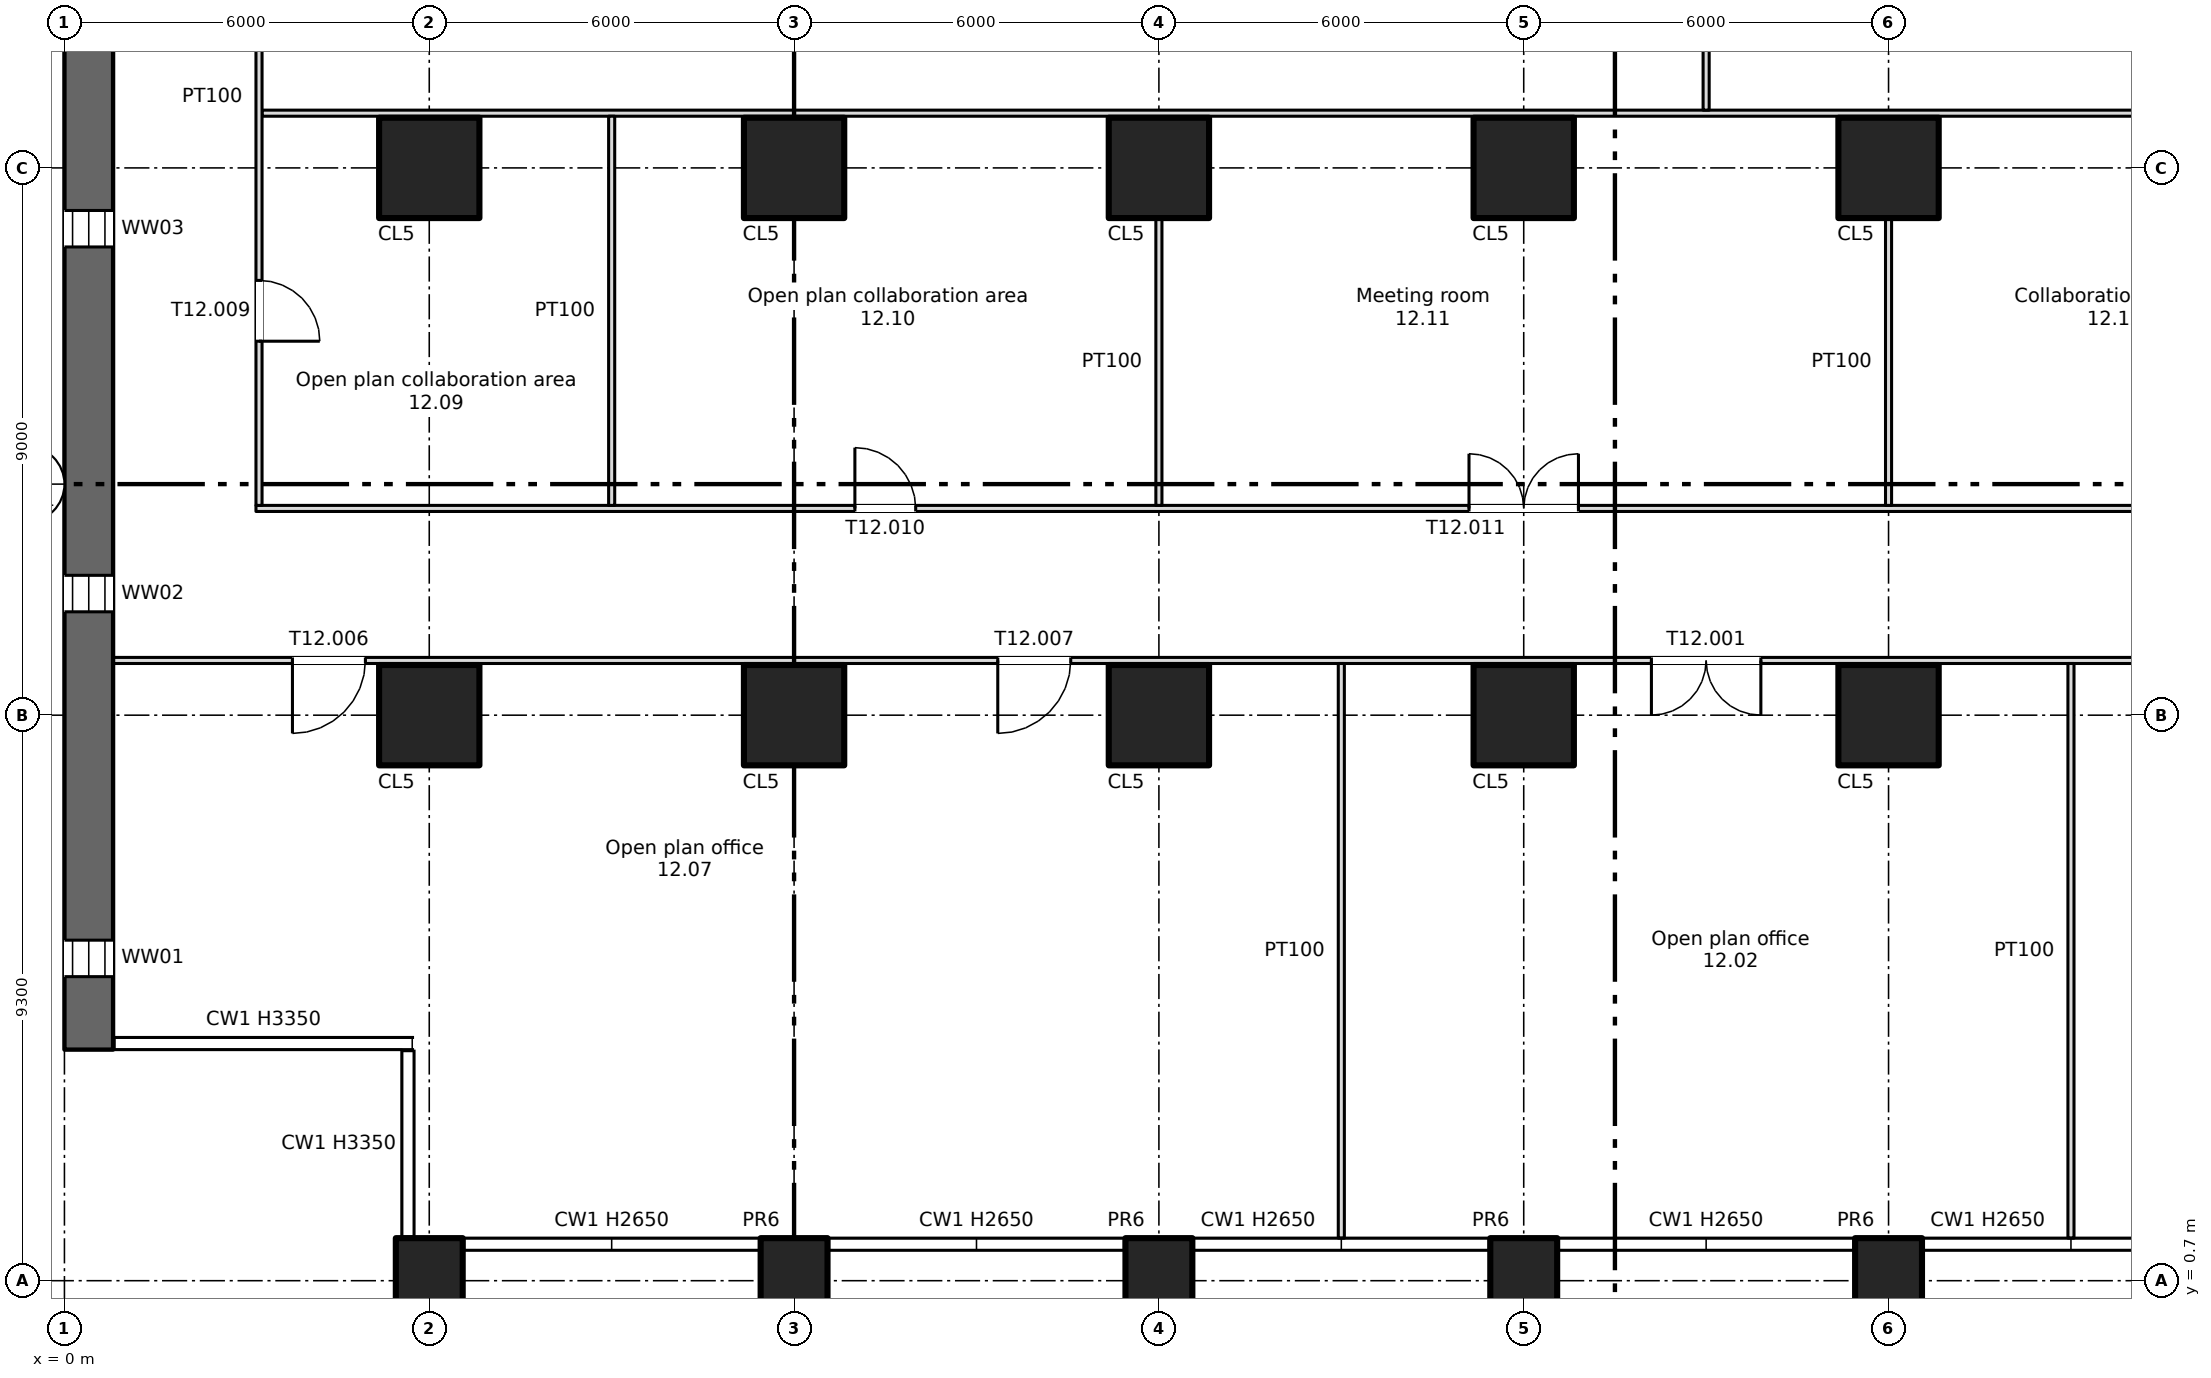
"""IFC4 building model, lengths in metres.
Left out: names, types, materials, properties, quantities, classifications, styles, units other than length and angle.
Written with IfcOpenShell. Run it as: python <this file> out.ifc"""

import sys

from ifc_helpers import new_model, si_unit, direction, frame, frame_2d, origin, origin_2d, place, context, subcontext, project, spatial, rectangle, extrude, element, fill, save


model = new_model("IFC4")
c1 = context("Model", 3, precision=1e-05, world=origin(), true_north=direction((0.0, 1.0)))
c2 = subcontext(c1, "Body", "Model", "MODEL_VIEW")
j1 = project(units=[si_unit("LENGTHUNIT", "METRE"), si_unit("PLANEANGLEUNIT", "RADIAN")], contexts=[c1])
p1 = place(None, origin())
s1 = spatial("IfcSite", under=j1, at=p1, CompositionType="ELEMENT")
p2 = place(p1, origin())
s2 = spatial("IfcBuilding", under=s1, at=p2, CompositionType="ELEMENT")
p3 = place(p2, frame((0.0, 0.0, 60.0)))
s3 = spatial("IfcBuildingStorey", under=s2, at=p3, CompositionType="ELEMENT", Elevation=60.0)
for number, where, z_axis, x_axis in (
    (1, (6.0, 0.7, -0.4), (0.0, 0.0, 1.0), (1.0, 0.0, 0.0)),
    (2, (12.0, 0.7, -0.4), (0.0, 0.0, 1.0), (1.0, 0.0, 0.0)),
    (3, (18.0, 0.7, -0.4), (0.0, 0.0, 1.0), (1.0, 0.0, 0.0)),
    (4, (24.0, 0.7, -0.4), (0.0, 0.0, 1.0), (1.0, 0.0, 0.0)),
    (5, (30.0, 0.7, -0.4), (0.0, 0.0, 1.0), (1.0, 0.0, 0.0)),
):
    element("IfcColumn", number, at=place(p3, frame(where, z_axis=z_axis, x_axis=x_axis)), inside=s3, PredefinedType="COLUMN", context=c2, shape_type="SweptSolid", body=[
        extrude(rectangle(XDim=1.1, YDim=1.4, at=origin_2d()), origin(), (0.0, 0.0, 1.0), 3.75),
    ])
for number, where, z_axis, x_axis in (
    (6, (6.0, 10.0, 0.0), (0.0, 0.0, 1.0), (1.0, 0.0, 0.0)),
    (7, (6.0, 19.0, 0.0), (0.0, 0.0, 1.0), (1.0, 0.0, 0.0)),
    (8, (12.0, 10.0, 0.0), (0.0, 0.0, 1.0), (1.0, 0.0, 0.0)),
    (9, (12.0, 19.0, 0.0), (0.0, 0.0, 1.0), (1.0, 0.0, 0.0)),
    (10, (18.0, 10.0, 0.0), (0.0, 0.0, 1.0), (1.0, 0.0, 0.0)),
    (11, (18.0, 19.0, 0.0), (0.0, 0.0, 1.0), (1.0, 0.0, 0.0)),
    (12, (24.0, 10.0, 0.0), (0.0, 0.0, 1.0), (1.0, 0.0, 0.0)),
    (13, (24.0, 19.0, 0.0), (0.0, 0.0, 1.0), (1.0, 0.0, 0.0)),
    (14, (30.0, 10.0, 0.0), (0.0, 0.0, 1.0), (1.0, 0.0, 0.0)),
    (15, (30.0, 19.0, 0.0), (0.0, 0.0, 1.0), (1.0, 0.0, 0.0)),
):
    element("IfcColumn", number, at=place(p3, frame(where, z_axis=z_axis, x_axis=x_axis)), inside=s3, PredefinedType="COLUMN", context=c2, shape_type="SweptSolid", body=[
        extrude(rectangle(XDim=1.65, YDim=1.65, at=origin_2d()), origin(), (0.0, 0.0, 1.0), 3.35),
    ])
p4 = place(p3, frame((0.4, 4.5, 0.0), z_axis=(0.0, 0.0, 1.0), x_axis=(0.0, 1.0, 0.0)))
e16 = element("IfcWall", 16, at=p4, inside=s3, PredefinedType="SHEAR", context=c2, shape_type="SweptSolid", body=[
    extrude(rectangle(XDim=37.0, YDim=0.8, at=frame_2d((18.5, 0.0))), origin(), (0.0, 0.0, 1.0), 3.35),
])
p5 = place(p4, frame((1.2, 0.0, 0.6)))
e17 = element("IfcOpeningElement", 17, at=p5, cuts=e16, PredefinedType="OPENING", context=c2, shape_type="SweptSolid", body=[
    extrude(rectangle(XDim=0.6, YDim=2.4, at=frame_2d((0.3, 1.2))), frame((0.0, 0.41, 0.0), z_axis=(0.0, -1.0, 0.0), x_axis=(1.0, 0.0, 0.0)), (0.0, 0.0, 1.0), 0.82),
])
p6 = place(p4, frame((7.2, 0.0, 0.6)))
e18 = element("IfcOpeningElement", 18, at=p6, cuts=e16, PredefinedType="OPENING", context=c2, shape_type="SweptSolid", body=[
    extrude(rectangle(XDim=0.6, YDim=2.4, at=frame_2d((0.3, 1.2))), frame((0.0, 0.41, 0.0), z_axis=(0.0, -1.0, 0.0), x_axis=(1.0, 0.0, 0.0)), (0.0, 0.0, 1.0), 0.82),
])
p7 = place(p4, frame((13.2, 0.0, 0.6)))
e19 = element("IfcOpeningElement", 19, at=p7, cuts=e16, PredefinedType="OPENING", context=c2, shape_type="SweptSolid", body=[
    extrude(rectangle(XDim=0.6, YDim=2.4, at=frame_2d((0.3, 1.2))), frame((0.0, 0.41, 0.0), z_axis=(0.0, -1.0, 0.0), x_axis=(1.0, 0.0, 0.0)), (0.0, 0.0, 1.0), 0.82),
])
p8 = place(p4, frame((19.2, 0.0, 0.6)))
e20 = element("IfcOpeningElement", 20, at=p8, cuts=e16, PredefinedType="OPENING", context=c2, shape_type="SweptSolid", body=[
    extrude(rectangle(XDim=0.6, YDim=2.4, at=frame_2d((0.3, 1.2))), frame((0.0, 0.41, 0.0), z_axis=(0.0, -1.0, 0.0), x_axis=(1.0, 0.0, 0.0)), (0.0, 0.0, 1.0), 0.82),
])
p9 = place(p4, frame((25.2, 0.0, 0.6)))
e21 = element("IfcOpeningElement", 21, at=p9, cuts=e16, PredefinedType="OPENING", context=c2, shape_type="SweptSolid", body=[
    extrude(rectangle(XDim=0.6, YDim=2.4, at=frame_2d((0.3, 1.2))), frame((0.0, 0.41, 0.0), z_axis=(0.0, -1.0, 0.0), x_axis=(1.0, 0.0, 0.0)), (0.0, 0.0, 1.0), 0.82),
])
p10 = place(p4, frame((31.2, 0.0, 0.6)))
e22 = element("IfcOpeningElement", 22, at=p10, cuts=e16, PredefinedType="OPENING", context=c2, shape_type="SweptSolid", body=[
    extrude(rectangle(XDim=0.6, YDim=2.4, at=frame_2d((0.3, 1.2))), frame((0.0, 0.41, 0.0), z_axis=(0.0, -1.0, 0.0), x_axis=(1.0, 0.0, 0.0)), (0.0, 0.0, 1.0), 0.82),
])
p11 = place(p3, frame((0.8, 10.9, 0.0), z_axis=(0.0, 0.0, 1.0), x_axis=(1.0, 0.0, 0.0)))
e23 = element("IfcWall", 23, at=p11, inside=s3, PredefinedType="PARTITIONING", context=c2, shape_type="SweptSolid", body=[
    extrude(rectangle(XDim=76.4, YDim=0.1, at=frame_2d((38.2, 0.0))), origin(), (0.0, 0.0, 1.0), 3.35),
])
p12 = place(p11, frame((25.3, 0.0, 0.0)))
e24 = element("IfcOpeningElement", 24, at=p12, cuts=e23, PredefinedType="OPENING", context=c2, shape_type="SweptSolid", body=[
    extrude(rectangle(XDim=1.8, YDim=2.1, at=frame_2d((0.9, 1.05))), frame((0.0, 0.06, 0.0), z_axis=(0.0, -1.0, 0.0), x_axis=(1.0, 0.0, 0.0)), (0.0, 0.0, 1.0), 0.12),
])
p13 = place(p11, frame((37.3, 0.0, 0.0)))
e25 = element("IfcOpeningElement", 25, at=p13, cuts=e23, PredefinedType="OPENING", context=c2, shape_type="SweptSolid", body=[
    extrude(rectangle(XDim=1.8, YDim=2.1, at=frame_2d((0.9, 1.05))), frame((0.0, 0.06, 0.0), z_axis=(0.0, -1.0, 0.0), x_axis=(1.0, 0.0, 0.0)), (0.0, 0.0, 1.0), 0.12),
])
p14 = place(p11, frame((48.2, 0.0, 0.0)))
e26 = element("IfcOpeningElement", 26, at=p14, cuts=e23, PredefinedType="OPENING", context=c2, shape_type="SweptSolid", body=[
    extrude(rectangle(XDim=1.0, YDim=2.1, at=frame_2d((0.5, 1.05))), frame((0.0, 0.06, 0.0), z_axis=(0.0, -1.0, 0.0), x_axis=(1.0, 0.0, 0.0)), (0.0, 0.0, 1.0), 0.12),
])
p15 = place(p11, frame((54.2, 0.0, 0.0)))
e27 = element("IfcOpeningElement", 27, at=p15, cuts=e23, PredefinedType="OPENING", context=c2, shape_type="SweptSolid", body=[
    extrude(rectangle(XDim=1.0, YDim=2.1, at=frame_2d((0.5, 1.05))), frame((0.0, 0.06, 0.0), z_axis=(0.0, -1.0, 0.0), x_axis=(1.0, 0.0, 0.0)), (0.0, 0.0, 1.0), 0.12),
])
p16 = place(p11, frame((61.3, 0.0, 0.0)))
e28 = element("IfcOpeningElement", 28, at=p16, cuts=e23, PredefinedType="OPENING", context=c2, shape_type="SweptSolid", body=[
    extrude(rectangle(XDim=1.8, YDim=2.1, at=frame_2d((0.9, 1.05))), frame((0.0, 0.06, 0.0), z_axis=(0.0, -1.0, 0.0), x_axis=(1.0, 0.0, 0.0)), (0.0, 0.0, 1.0), 0.12),
])
p17 = place(p11, frame((2.95, 0.0, 0.0)))
e29 = element("IfcOpeningElement", 29, at=p17, cuts=e23, PredefinedType="OPENING", context=c2, shape_type="SweptSolid", body=[
    extrude(rectangle(XDim=1.2, YDim=2.1, at=frame_2d((0.6, 1.05))), frame((0.0, 0.06, 0.0), z_axis=(0.0, -1.0, 0.0), x_axis=(1.0, 0.0, 0.0)), (0.0, 0.0, 1.0), 0.12),
])
p18 = place(p11, frame((14.55, 0.0, 0.0)))
e30 = element("IfcOpeningElement", 30, at=p18, cuts=e23, PredefinedType="OPENING", context=c2, shape_type="SweptSolid", body=[
    extrude(rectangle(XDim=1.2, YDim=2.1, at=frame_2d((0.6, 1.05))), frame((0.0, 0.06, 0.0), z_axis=(0.0, -1.0, 0.0), x_axis=(1.0, 0.0, 0.0)), (0.0, 0.0, 1.0), 0.12),
])
p19 = place(p11, frame((72.15, 0.0, 0.0)))
e31 = element("IfcOpeningElement", 31, at=p19, cuts=e23, PredefinedType="OPENING", context=c2, shape_type="SweptSolid", body=[
    extrude(rectangle(XDim=1.8, YDim=2.1, at=frame_2d((0.9, 1.05))), frame((0.0, 0.06, 0.0), z_axis=(0.0, -1.0, 0.0), x_axis=(1.0, 0.0, 0.0)), (0.0, 0.0, 1.0), 0.12),
])
p20 = place(p3, frame((3.15, 13.4, 0.0), z_axis=(0.0, 0.0, 1.0), x_axis=(1.0, 0.0, 0.0)))
e32 = element("IfcWall", 32, at=p20, inside=s3, PredefinedType="PARTITIONING", context=c2, shape_type="SweptSolid", body=[
    extrude(rectangle(XDim=71.7, YDim=0.1, at=frame_2d((35.85, 0.0))), origin(), (0.0, 0.0, 1.0), 3.35),
])
p21 = place(p20, frame((9.85, 0.0, 0.0)))
e33 = element("IfcOpeningElement", 33, at=p21, cuts=e32, PredefinedType="OPENING", context=c2, shape_type="SweptSolid", body=[
    extrude(rectangle(XDim=1.0, YDim=2.1, at=frame_2d((0.5, 1.05))), frame((0.0, 0.06, 0.0), z_axis=(0.0, -1.0, 0.0), x_axis=(1.0, 0.0, 0.0)), (0.0, 0.0, 1.0), 0.12),
])
p22 = place(p20, frame((19.95, 0.0, 0.0)))
e34 = element("IfcOpeningElement", 34, at=p22, cuts=e32, PredefinedType="OPENING", context=c2, shape_type="SweptSolid", body=[
    extrude(rectangle(XDim=1.8, YDim=2.1, at=frame_2d((0.9, 1.05))), frame((0.0, 0.06, 0.0), z_axis=(0.0, -1.0, 0.0), x_axis=(1.0, 0.0, 0.0)), (0.0, 0.0, 1.0), 0.12),
])
p23 = place(p20, frame((31.95, 0.0, 0.0)))
e35 = element("IfcOpeningElement", 35, at=p23, cuts=e32, PredefinedType="OPENING", context=c2, shape_type="SweptSolid", body=[
    extrude(rectangle(XDim=1.8, YDim=2.1, at=frame_2d((0.9, 1.05))), frame((0.0, 0.06, 0.0), z_axis=(0.0, -1.0, 0.0), x_axis=(1.0, 0.0, 0.0)), (0.0, 0.0, 1.0), 0.12),
])
p24 = place(p20, frame((43.95, 0.0, 0.0)))
e36 = element("IfcOpeningElement", 36, at=p24, cuts=e32, PredefinedType="OPENING", context=c2, shape_type="SweptSolid", body=[
    extrude(rectangle(XDim=1.8, YDim=2.1, at=frame_2d((0.9, 1.05))), frame((0.0, 0.06, 0.0), z_axis=(0.0, -1.0, 0.0), x_axis=(1.0, 0.0, 0.0)), (0.0, 0.0, 1.0), 0.12),
])
p25 = place(p20, frame((55.95, 0.0, 0.0)))
e37 = element("IfcOpeningElement", 37, at=p25, cuts=e32, PredefinedType="OPENING", context=c2, shape_type="SweptSolid", body=[
    extrude(rectangle(XDim=1.8, YDim=2.1, at=frame_2d((0.9, 1.05))), frame((0.0, 0.06, 0.0), z_axis=(0.0, -1.0, 0.0), x_axis=(1.0, 0.0, 0.0)), (0.0, 0.0, 1.0), 0.12),
])
p26 = place(p20, frame((66.75, 0.0, 0.0)))
e38 = element("IfcOpeningElement", 38, at=p26, cuts=e32, PredefinedType="OPENING", context=c2, shape_type="SweptSolid", body=[
    extrude(rectangle(XDim=1.0, YDim=2.1, at=frame_2d((0.5, 1.05))), frame((0.0, 0.06, 0.0), z_axis=(0.0, -1.0, 0.0), x_axis=(1.0, 0.0, 0.0)), (0.0, 0.0, 1.0), 0.12),
])
p27 = place(p3, frame((3.25, 19.9, 0.0), z_axis=(0.0, 0.0, 1.0), x_axis=(1.0, 0.0, 0.0)))
e39 = element("IfcWall", 39, at=p27, inside=s3, PredefinedType="PARTITIONING", context=c2, shape_type="SweptSolid", body=[
    extrude(rectangle(XDim=71.5, YDim=0.1, at=frame_2d((35.75, 0.0))), origin(), (0.0, 0.0, 1.0), 3.35),
])
p28 = place(p3, frame((3.2, 13.45, 0.0), z_axis=(0.0, 0.0, 1.0), x_axis=(0.0, 1.0, 0.0)))
e40 = element("IfcWall", 40, at=p28, inside=s3, PredefinedType="PARTITIONING", context=c2, shape_type="SweptSolid", body=[
    extrude(rectangle(XDim=11.5, YDim=0.1, at=frame_2d((5.75, 0.0))), origin(), (0.0, 0.0, 1.0), 3.35),
])
p29 = place(p28, frame((2.7, 0.0, 0.0)))
e41 = element("IfcOpeningElement", 41, at=p29, cuts=e40, PredefinedType="OPENING", context=c2, shape_type="SweptSolid", body=[
    extrude(rectangle(XDim=1.0, YDim=2.1, at=frame_2d((0.5, 1.05))), frame((0.0, 0.06, 0.0), z_axis=(0.0, -1.0, 0.0), x_axis=(1.0, 0.0, 0.0)), (0.0, 0.0, 1.0), 0.12),
])
p30 = place(p3, frame((9.0, 13.45, 0.0), z_axis=(0.0, 0.0, 1.0), x_axis=(0.0, 1.0, 0.0)))
e42 = element("IfcWall", 42, at=p30, inside=s3, PredefinedType="PARTITIONING", context=c2, shape_type="SweptSolid", body=[
    extrude(rectangle(XDim=6.4, YDim=0.1, at=frame_2d((3.2, 0.0))), origin(), (0.0, 0.0, 1.0), 3.35),
])
p31 = place(p3, frame((18.0, 13.45, 0.0), z_axis=(0.0, 0.0, 1.0), x_axis=(0.0, 1.0, 0.0)))
e43 = element("IfcWall", 43, at=p31, inside=s3, PredefinedType="PARTITIONING", context=c2, shape_type="SweptSolid", body=[
    extrude(rectangle(XDim=4.725, YDim=0.1, at=frame_2d((2.363, 0.0))), origin(), (0.0, 0.0, 1.0), 3.35),
])
p32 = place(p3, frame((21.0, 1.4, 0.0), z_axis=(0.0, 0.0, 1.0), x_axis=(0.0, 1.0, 0.0)))
e44 = element("IfcWall", 44, at=p32, inside=s3, PredefinedType="PARTITIONING", context=c2, shape_type="SweptSolid", body=[
    extrude(rectangle(XDim=9.45, YDim=0.1, at=frame_2d((4.725, 0.0))), origin(), (0.0, 0.0, 1.0), 3.35),
])
p33 = place(p3, frame((27.0, 19.95, 0.0), z_axis=(0.0, 0.0, 1.0), x_axis=(0.0, 1.0, 0.0)))
e45 = element("IfcWall", 45, at=p33, inside=s3, PredefinedType="PARTITIONING", context=c2, shape_type="SweptSolid", body=[
    extrude(rectangle(XDim=5.0, YDim=0.1, at=frame_2d((2.5, 0.0))), origin(), (0.0, 0.0, 1.0), 3.35),
])
p34 = place(p3, frame((30.0, 13.45, 0.0), z_axis=(0.0, 0.0, 1.0), x_axis=(0.0, 1.0, 0.0)))
e46 = element("IfcWall", 46, at=p34, inside=s3, PredefinedType="PARTITIONING", context=c2, shape_type="SweptSolid", body=[
    extrude(rectangle(XDim=4.725, YDim=0.1, at=frame_2d((2.363, 0.0))), origin(), (0.0, 0.0, 1.0), 3.35),
])
p35 = place(p3, frame((33.0, 1.4, 0.0), z_axis=(0.0, 0.0, 1.0), x_axis=(0.0, 1.0, 0.0)))
e47 = element("IfcWall", 47, at=p35, inside=s3, PredefinedType="PARTITIONING", context=c2, shape_type="SweptSolid", body=[
    extrude(rectangle(XDim=9.45, YDim=0.1, at=frame_2d((4.725, 0.0))), origin(), (0.0, 0.0, 1.0), 3.35),
])
p36 = place(p5, origin())
e48 = element("IfcWindow", 48, at=p36, inside=s3, PartitioningType="SINGLE_PANEL", PredefinedType="WINDOW", context=c2, shape_type="SweptSolid", body=[
    extrude(rectangle(XDim=0.6, YDim=2.4, at=frame_2d((0.3, 1.2))), frame((0.0, 0.03, 0.0), z_axis=(0.0, -1.0, 0.0), x_axis=(1.0, 0.0, 0.0)), (0.0, 0.0, 1.0), 0.06),
])
fill(e17, e48)
p37 = place(p6, origin())
e49 = element("IfcWindow", 49, at=p37, inside=s3, PartitioningType="SINGLE_PANEL", PredefinedType="WINDOW", context=c2, shape_type="SweptSolid", body=[
    extrude(rectangle(XDim=0.6, YDim=2.4, at=frame_2d((0.3, 1.2))), frame((0.0, 0.03, 0.0), z_axis=(0.0, -1.0, 0.0), x_axis=(1.0, 0.0, 0.0)), (0.0, 0.0, 1.0), 0.06),
])
fill(e18, e49)
p38 = place(p7, origin())
e50 = element("IfcWindow", 50, at=p38, inside=s3, PartitioningType="SINGLE_PANEL", PredefinedType="WINDOW", context=c2, shape_type="SweptSolid", body=[
    extrude(rectangle(XDim=0.6, YDim=2.4, at=frame_2d((0.3, 1.2))), frame((0.0, 0.03, 0.0), z_axis=(0.0, -1.0, 0.0), x_axis=(1.0, 0.0, 0.0)), (0.0, 0.0, 1.0), 0.06),
])
fill(e19, e50)
p39 = place(p12, origin())
e51 = element("IfcDoor", 51, at=p39, inside=s3, OperationType="DOUBLE_DOOR_SINGLE_SWING", PredefinedType="DOOR", context=c2, shape_type="SweptSolid", body=[
    extrude(rectangle(XDim=1.8, YDim=2.1, at=frame_2d((0.9, 1.05))), frame((0.0, 0.025, 0.0), z_axis=(0.0, -1.0, 0.0), x_axis=(1.0, 0.0, 0.0)), (0.0, 0.0, 1.0), 0.05),
])
fill(e24, e51)
p40 = place(p17, origin())
e52 = element("IfcDoor", 52, at=p40, inside=s3, OperationType="SINGLE_SWING_LEFT", PredefinedType="DOOR", context=c2, shape_type="SweptSolid", body=[
    extrude(rectangle(XDim=1.2, YDim=2.1, at=frame_2d((0.6, 1.05))), frame((0.0, 0.025, 0.0), z_axis=(0.0, -1.0, 0.0), x_axis=(1.0, 0.0, 0.0)), (0.0, 0.0, 1.0), 0.05),
])
fill(e29, e52)
p41 = place(p18, origin())
e53 = element("IfcDoor", 53, at=p41, inside=s3, OperationType="SINGLE_SWING_LEFT", PredefinedType="DOOR", context=c2, shape_type="SweptSolid", body=[
    extrude(rectangle(XDim=1.2, YDim=2.1, at=frame_2d((0.6, 1.05))), frame((0.0, 0.025, 0.0), z_axis=(0.0, -1.0, 0.0), x_axis=(1.0, 0.0, 0.0)), (0.0, 0.0, 1.0), 0.05),
])
fill(e30, e53)
p42 = place(p29, origin())
e54 = element("IfcDoor", 54, at=p42, inside=s3, OperationType="SINGLE_SWING_LEFT", PredefinedType="DOOR", context=c2, shape_type="SweptSolid", body=[
    extrude(rectangle(XDim=1.0, YDim=2.1, at=frame_2d((0.5, 1.05))), frame((0.0, 0.025, 0.0), z_axis=(0.0, -1.0, 0.0), x_axis=(1.0, 0.0, 0.0)), (0.0, 0.0, 1.0), 0.05),
])
fill(e41, e54)
p43 = place(p21, origin())
e55 = element("IfcDoor", 55, at=p43, inside=s3, OperationType="SINGLE_SWING_LEFT", PredefinedType="DOOR", context=c2, shape_type="SweptSolid", body=[
    extrude(rectangle(XDim=1.0, YDim=2.1, at=frame_2d((0.5, 1.05))), frame((0.0, 0.025, 0.0), z_axis=(0.0, -1.0, 0.0), x_axis=(1.0, 0.0, 0.0)), (0.0, 0.0, 1.0), 0.05),
])
fill(e33, e55)
p44 = place(p22, origin())
e56 = element("IfcDoor", 56, at=p44, inside=s3, OperationType="DOUBLE_DOOR_SINGLE_SWING", PredefinedType="DOOR", context=c2, shape_type="SweptSolid", body=[
    extrude(rectangle(XDim=1.8, YDim=2.1, at=frame_2d((0.9, 1.05))), frame((0.0, 0.025, 0.0), z_axis=(0.0, -1.0, 0.0), x_axis=(1.0, 0.0, 0.0)), (0.0, 0.0, 1.0), 0.05),
])
fill(e34, e56)
save(model, sys.argv[1])
